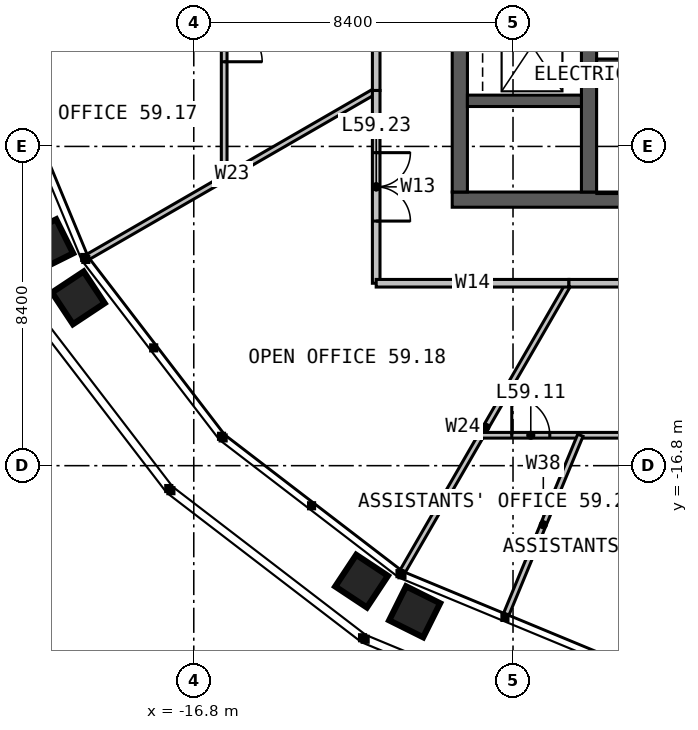
"""IFC4 building model, lengths in metres.
Left out: names, types, materials, properties, quantities, classifications, styles, units other than length and angle.
Written with IfcOpenShell. Run it as: python <this file> out.ifc"""

import sys

from ifc_helpers import new_model, si_unit, direction, frame, frame_2d, origin, place, context, subcontext, project, spatial, rectangle, extrude, element, fill, save


model = new_model("IFC4")
c1 = context("Model", 3, precision=1e-05, world=origin(), true_north=direction((0.0, 1.0)))
c2 = subcontext(c1, "Body", "Model", "MODEL_VIEW")
j1 = project(units=[si_unit("LENGTHUNIT", "METRE"), si_unit("PLANEANGLEUNIT", "RADIAN")], contexts=[c1])
p1 = place(None, origin())
s1 = spatial("IfcSite", under=j1, at=p1, CompositionType="ELEMENT")
p2 = place(p1, origin())
s2 = spatial("IfcBuilding", under=s1, at=p2, CompositionType="ELEMENT")
p3 = place(p2, frame((0.0, 0.0, 244.0)))
s3 = spatial("IfcBuildingStorey", under=s2, at=p3, CompositionType="ELEMENT", Elevation=244.0)
p4 = place(p3, frame((10.0, -9.8, 0.0), z_axis=(0.0, 0.0, 1.0), x_axis=(-1.0, 0.0, 0.0)))
e1 = element("IfcWall", 1, at=p4, inside=s3, PredefinedType="SOLIDWALL", context=c2, shape_type="SweptSolid", body=[
    extrude(rectangle(XDim=20.0, YDim=0.4, at=frame_2d((10.0, 0.0))), origin(), (0.0, 0.0, 1.0), 4.0),
])
p5 = place(p4, frame((6.875, 0.0, 0.0)))
e2 = element("IfcOpeningElement", 2, at=p5, cuts=e1, PredefinedType="OPENING", context=c2, shape_type="SweptSolid", body=[
    extrude(rectangle(XDim=1.2, YDim=2.2, at=frame_2d((0.6, 1.1))), frame((0.0, 0.21, 0.0), z_axis=(0.0, -1.0, 0.0), x_axis=(1.0, 0.0, 0.0)), (0.0, 0.0, 1.0), 0.42),
])
p6 = place(p3, frame((-9.8, 9.6, 0.0), z_axis=(0.0, 0.0, 1.0), x_axis=(0.0, -1.0, 0.0)))
e3 = element("IfcWall", 3, at=p6, inside=s3, PredefinedType="SOLIDWALL", context=c2, shape_type="SweptSolid", body=[
    extrude(rectangle(XDim=19.2, YDim=0.4, at=frame_2d((9.6, 0.0))), origin(), (0.0, 0.0, 1.0), 4.0),
])
p7 = place(p3, frame((-6.4, -9.6, 0.0), z_axis=(0.0, 0.0, 1.0), x_axis=(0.0, 1.0, 0.0)))
e4 = element("IfcWall", 4, at=p7, inside=s3, PredefinedType="SOLIDWALL", context=c2, shape_type="SweptSolid", body=[
    extrude(rectangle(XDim=19.2, YDim=0.4, at=frame_2d((9.6, 0.0))), origin(), (0.0, 0.0, 1.0), 4.0),
])
p8 = place(p7, frame((9.1, 0.0, 0.0)))
e5 = element("IfcOpeningElement", 5, at=p8, cuts=e4, PredefinedType="OPENING", context=c2, shape_type="SweptSolid", body=[
    extrude(rectangle(XDim=1.0, YDim=2.2, at=frame_2d((0.5, 1.1))), frame((0.0, 0.21, 0.0), z_axis=(0.0, -1.0, 0.0), x_axis=(1.0, 0.0, 0.0)), (0.0, 0.0, 1.0), 0.42),
])
p9 = place(p3, frame((-6.2, -6.2, 0.0), z_axis=(0.0, 0.0, 1.0), x_axis=(1.0, 0.0, 0.0)))
e6 = element("IfcWall", 6, at=p9, inside=s3, PredefinedType="SOLIDWALL", context=c2, shape_type="SweptSolid", body=[
    extrude(rectangle(XDim=7.4, YDim=0.2, at=frame_2d((3.7, 0.0))), origin(), (0.0, 0.0, 1.0), 4.0),
])
p10 = place(p3, frame((-9.6, -7.2, 0.0), z_axis=(0.0, 0.0, 1.0), x_axis=(1.0, 0.0, 0.0)))
e7 = element("IfcWall", 7, at=p10, inside=s3, PredefinedType="SOLIDWALL", context=c2, shape_type="SweptSolid", body=[
    extrude(rectangle(XDim=3.0, YDim=0.3, at=frame_2d((1.5, 0.0))), origin(), (0.0, 0.0, 1.0), 4.0),
])
for number, where, z_axis, x_axis in (
    (8, (-12.0, -6.928, 0.0), (0.0, 0.0, 1.0), (-0.866, -0.5, 0.0)),
    (9, (-6.928, -12.0, 0.0), (0.0, 0.0, 1.0), (-0.5, -0.866, 0.0)),
):
    element("IfcWall", number, at=place(p3, frame(where, z_axis=z_axis, x_axis=x_axis)), inside=s3, PredefinedType="PARTITIONING", context=c2, shape_type="SweptSolid", body=[
        extrude(rectangle(XDim=8.753, YDim=0.15, at=frame_2d((4.376, 0.0))), origin(), (0.0, 0.0, 1.0), 2.79),
    ])
p11 = place(p3, frame((-16.0, 9.238, 0.0), z_axis=(0.0, 0.0, 1.0), x_axis=(0.0, -1.0, 0.0)))
e10 = element("IfcWall", 10, at=p11, inside=s3, PredefinedType="PARTITIONING", context=c2, shape_type="SweptSolid", body=[
    extrude(rectangle(XDim=18.475, YDim=0.15, at=frame_2d((9.238, 0.0))), origin(), (0.0, 0.0, 1.0), 2.79),
])
p12 = place(p11, frame((3.066, 0.0, 0.0)))
e11 = element("IfcOpeningElement", 11, at=p12, cuts=e10, PredefinedType="OPENING", context=c2, shape_type="SweptSolid", body=[
    extrude(rectangle(XDim=1.0, YDim=2.2, at=frame_2d((0.5, 1.1))), frame((0.0, 0.085, 0.0), z_axis=(0.0, -1.0, 0.0), x_axis=(1.0, 0.0, 0.0)), (0.0, 0.0, 1.0), 0.17),
])
p13 = place(p11, frame((8.738, 0.0, 0.0)))
e12 = element("IfcOpeningElement", 12, at=p13, cuts=e10, PredefinedType="OPENING", context=c2, shape_type="SweptSolid", body=[
    extrude(rectangle(XDim=1.0, YDim=2.2, at=frame_2d((0.5, 1.1))), frame((0.0, 0.085, 0.0), z_axis=(0.0, -1.0, 0.0), x_axis=(1.0, 0.0, 0.0)), (0.0, 0.0, 1.0), 0.17),
])
p14 = place(p11, frame((14.41, 0.0, 0.0)))
e13 = element("IfcOpeningElement", 13, at=p14, cuts=e10, PredefinedType="OPENING", context=c2, shape_type="SweptSolid", body=[
    extrude(rectangle(XDim=1.0, YDim=2.2, at=frame_2d((0.5, 1.1))), frame((0.0, 0.085, 0.0), z_axis=(0.0, -1.0, 0.0), x_axis=(1.0, 0.0, 0.0)), (0.0, 0.0, 1.0), 0.17),
])
p15 = place(p3, frame((-12.0, 6.928, 0.0), z_axis=(0.0, 0.0, 1.0), x_axis=(0.0, -1.0, 0.0)))
e14 = element("IfcWall", 14, at=p15, inside=s3, PredefinedType="PARTITIONING", context=c2, shape_type="SweptSolid", body=[
    extrude(rectangle(XDim=13.856, YDim=0.2, at=frame_2d((6.928, 0.0))), origin(), (0.0, 0.0, 1.0), 3.8),
])
p16 = place(p15, frame((6.028, 0.0, 0.0)))
e15 = element("IfcOpeningElement", 15, at=p16, cuts=e14, PredefinedType="OPENING", context=c2, shape_type="SweptSolid", body=[
    extrude(rectangle(XDim=1.8, YDim=2.2, at=frame_2d((0.9, 1.1))), frame((0.0, 0.11, 0.0), z_axis=(0.0, -1.0, 0.0), x_axis=(1.0, 0.0, 0.0)), (0.0, 0.0, 1.0), 0.22),
])
p17 = place(p3, frame((-12.0, -6.928, 0.0), z_axis=(0.0, 0.0, 1.0), x_axis=(0.0, -1.0, 0.0)))
e16 = element("IfcWall", 16, at=p17, inside=s3, PredefinedType="PARTITIONING", context=c2, shape_type="SweptSolid", body=[
    extrude(rectangle(XDim=5.072, YDim=0.2, at=frame_2d((2.536, 0.0))), origin(), (0.0, 0.0, 1.0), 3.8),
])
p18 = place(p17, frame((1.636, 0.0, 0.0)))
e17 = element("IfcOpeningElement", 17, at=p18, cuts=e16, PredefinedType="OPENING", context=c2, shape_type="SweptSolid", body=[
    extrude(rectangle(XDim=1.8, YDim=2.2, at=frame_2d((0.9, 1.1))), frame((0.0, 0.11, 0.0), z_axis=(0.0, -1.0, 0.0), x_axis=(1.0, 0.0, 0.0)), (0.0, 0.0, 1.0), 0.22),
])
p19 = place(p3, frame((-12.0, -12.0, 0.0), z_axis=(0.0, 0.0, 1.0), x_axis=(1.0, 0.0, 0.0)))
e18 = element("IfcWall", 18, at=p19, inside=s3, PredefinedType="PARTITIONING", context=c2, shape_type="SweptSolid", body=[
    extrude(rectangle(XDim=5.072, YDim=0.2, at=frame_2d((2.536, 0.0))), origin(), (0.0, 0.0, 1.0), 3.8),
])
p20 = place(p3, frame((-9.238, -16.0, 0.0), z_axis=(0.0, 0.0, 1.0), x_axis=(1.0, 0.0, 0.0)))
e19 = element("IfcWall", 19, at=p20, inside=s3, PredefinedType="PARTITIONING", context=c2, shape_type="SweptSolid", body=[
    extrude(rectangle(XDim=18.475, YDim=0.15, at=frame_2d((9.238, 0.0))), origin(), (0.0, 0.0, 1.0), 2.79),
])
p21 = place(p20, frame((0.805, 0.0, 0.0)))
e20 = element("IfcOpeningElement", 20, at=p21, cuts=e19, PredefinedType="OPENING", context=c2, shape_type="SweptSolid", body=[
    extrude(rectangle(XDim=1.0, YDim=2.2, at=frame_2d((0.5, 1.1))), frame((0.0, 0.085, 0.0), z_axis=(0.0, -1.0, 0.0), x_axis=(1.0, 0.0, 0.0)), (0.0, 0.0, 1.0), 0.17),
])
p22 = place(p20, frame((4.371, 0.0, 0.0)))
e21 = element("IfcOpeningElement", 21, at=p22, cuts=e19, PredefinedType="OPENING", context=c2, shape_type="SweptSolid", body=[
    extrude(rectangle(XDim=1.0, YDim=2.2, at=frame_2d((0.5, 1.1))), frame((0.0, 0.085, 0.0), z_axis=(0.0, -1.0, 0.0), x_axis=(1.0, 0.0, 0.0)), (0.0, 0.0, 1.0), 0.17),
])
p23 = place(p20, frame((8.738, 0.0, 0.0)))
e22 = element("IfcOpeningElement", 22, at=p23, cuts=e19, PredefinedType="OPENING", context=c2, shape_type="SweptSolid", body=[
    extrude(rectangle(XDim=1.0, YDim=2.2, at=frame_2d((0.5, 1.1))), frame((0.0, 0.085, 0.0), z_axis=(0.0, -1.0, 0.0), x_axis=(1.0, 0.0, 0.0)), (0.0, 0.0, 1.0), 0.17),
])
p24 = place(p20, frame((11.934, 0.0, 0.0)))
e23 = element("IfcOpeningElement", 23, at=p24, cuts=e19, PredefinedType="OPENING", context=c2, shape_type="SweptSolid", body=[
    extrude(rectangle(XDim=1.0, YDim=2.2, at=frame_2d((0.5, 1.1))), frame((0.0, 0.085, 0.0), z_axis=(0.0, -1.0, 0.0), x_axis=(1.0, 0.0, 0.0)), (0.0, 0.0, 1.0), 0.17),
])
p25 = place(p20, frame((15.5, 0.0, 0.0)))
e24 = element("IfcOpeningElement", 24, at=p25, cuts=e19, PredefinedType="OPENING", context=c2, shape_type="SweptSolid", body=[
    extrude(rectangle(XDim=1.0, YDim=2.2, at=frame_2d((0.5, 1.1))), frame((0.0, 0.085, 0.0), z_axis=(0.0, -1.0, 0.0), x_axis=(1.0, 0.0, 0.0)), (0.0, 0.0, 1.0), 0.17),
])
p26 = place(p3, frame((-6.627, -16.0, 0.0), z_axis=(0.0, 0.0, 1.0), x_axis=(-0.382676089488, -0.923882573996, 0.0)))
e25 = element("IfcWall", 25, at=p26, inside=s3, PredefinedType="PARTITIONING", context=c2, shape_type="SweptSolid", body=[
    extrude(rectangle(XDim=5.097, YDim=0.15, at=frame_2d((2.549, 0.0))), origin(), (0.0, 0.0, 1.0), 2.79),
])
p27 = place(p3, frame((-6.928, -12.0, 0.0), z_axis=(0.0, 0.0, 1.0), x_axis=(1.0, 0.0, 0.0)))
e26 = element("IfcWall", 26, at=p27, inside=s3, PredefinedType="PARTITIONING", context=c2, shape_type="SweptSolid", body=[
    extrude(rectangle(XDim=13.856, YDim=0.2, at=frame_2d((6.928, 0.0))), origin(), (0.0, 0.0, 1.0), 3.8),
])
p28 = place(p27, frame((6.028, 0.0, 0.0)))
e27 = element("IfcOpeningElement", 27, at=p28, cuts=e26, PredefinedType="OPENING", context=c2, shape_type="SweptSolid", body=[
    extrude(rectangle(XDim=1.8, YDim=2.2, at=frame_2d((0.9, 1.1))), frame((0.0, 0.11, 0.0), z_axis=(0.0, -1.0, 0.0), x_axis=(1.0, 0.0, 0.0)), (0.0, 0.0, 1.0), 0.22),
])
p29 = place(p14, origin())
e28 = element("IfcDoor", 28, at=p29, inside=s3, OperationType="SINGLE_SWING_RIGHT", PredefinedType="DOOR", context=c2, shape_type="SweptSolid", body=[
    extrude(rectangle(XDim=1.0, YDim=2.2, at=frame_2d((0.5, 1.1))), frame((0.0, 0.025, 0.0), z_axis=(0.0, -1.0, 0.0), x_axis=(1.0, 0.0, 0.0)), (0.0, 0.0, 1.0), 0.05),
])
fill(e13, e28)
p30 = place(p18, origin())
e29 = element("IfcDoor", 29, at=p30, inside=s3, OperationType="DOUBLE_DOOR_SINGLE_SWING", PredefinedType="DOOR", context=c2, shape_type="SweptSolid", body=[
    extrude(rectangle(XDim=1.8, YDim=2.2, at=frame_2d((0.9, 1.1))), frame((0.0, 0.025, 0.0), z_axis=(0.0, -1.0, 0.0), x_axis=(1.0, 0.0, 0.0)), (0.0, 0.0, 1.0), 0.05),
])
fill(e17, e29)
p31 = place(p21, origin())
e30 = element("IfcDoor", 30, at=p31, inside=s3, OperationType="SINGLE_SWING_LEFT", PredefinedType="DOOR", context=c2, shape_type="SweptSolid", body=[
    extrude(rectangle(XDim=1.0, YDim=2.2, at=frame_2d((0.5, 1.1))), frame((0.0, 0.025, 0.0), z_axis=(0.0, -1.0, 0.0), x_axis=(1.0, 0.0, 0.0)), (0.0, 0.0, 1.0), 0.05),
])
fill(e20, e30)
save(model, sys.argv[1])
